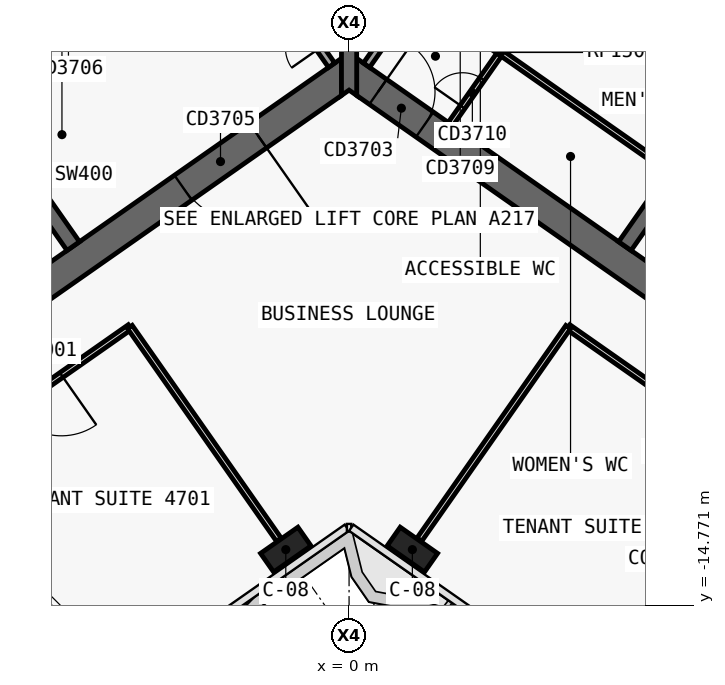
"""IFC4 building model, lengths in metres.
Left out: names, types, materials, properties, quantities, classifications, styles, units other than length and angle.
Written with IfcOpenShell. Run it as: python <this file> out.ifc"""

import sys

from ifc_helpers import new_model, si_unit, direction, frame, frame_2d, origin, origin_2d, place, context, subcontext, project, spatial, polyline, rectangle, outline, extrude, element, fill, save


model = new_model("IFC4")
c1 = context("Model", 3, precision=1e-05, world=origin(), true_north=direction((0.0, 1.0)))
c2 = subcontext(c1, "Body", "Model", "MODEL_VIEW")
j1 = project(units=[si_unit("LENGTHUNIT", "METRE"), si_unit("PLANEANGLEUNIT", "RADIAN")], contexts=[c1])
p1 = place(None, origin())
s1 = spatial("IfcSite", under=j1, at=p1, CompositionType="ELEMENT")
p2 = place(p1, origin())
s2 = spatial("IfcBuilding", under=s1, at=p2, CompositionType="ELEMENT")
p3 = place(p2, frame((0.0, 0.0, 202.2)))
s3 = spatial("IfcBuildingStorey", under=s2, at=p3, CompositionType="ELEMENT", Elevation=202.2)
p4 = place(p3, frame((0.029, 11.984, 0.0), z_axis=(0.0, 0.0, 1.0), x_axis=(-0.819151382952, -0.573577380837, 0.0)))
e1 = element("IfcWall", 1, at=p4, inside=s3, PredefinedType="SHEAR", context=c2, shape_type="SweptSolid", body=[
    extrude(outline(polyline([(33.898, 0.4), (0.56, 0.4), (-0.0, -0.4), (33.898, -0.4), (33.898, 0.4)])), origin(), (0.0, 0.0, 1.0), 3.9),
])
p5 = place(p3, frame((0.029, -0.712, 0.0), z_axis=(0.0, 0.0, 1.0), x_axis=(-0.819151758019, -0.573576845187, 0.0)))
e2 = element("IfcWall", 2, at=p5, inside=s3, PredefinedType="SHEAR", context=c2, shape_type="SweptSolid", body=[
    extrude(outline(polyline([(26.616, 0.4), (0.56, 0.4), (-0.0, -0.4), (26.616, -0.4), (26.616, 0.4)])), origin(), (0.0, 0.0, 1.0), 3.9),
])
p6 = place(p5, frame((2.966, 0.0, 0.0)))
e3 = element("IfcOpeningElement", 3, at=p6, cuts=e2, PredefinedType="OPENING", context=c2, shape_type="SweptSolid", body=[
    extrude(rectangle(XDim=2.4, YDim=2.1, at=frame_2d((1.2, 1.05))), frame((0.0, 0.41, 0.0), z_axis=(0.0, -1.0, 0.0), x_axis=(1.0, 0.0, 0.0)), (0.0, 0.0, 1.0), 0.82),
])
p7 = place(p5, frame((11.916, 0.0, 0.0)))
e4 = element("IfcOpeningElement", 4, at=p7, cuts=e2, PredefinedType="OPENING", context=c2, shape_type="SweptSolid", body=[
    extrude(rectangle(XDim=2.4, YDim=2.1, at=frame_2d((1.2, 1.05))), frame((0.0, 0.41, 0.0), z_axis=(0.0, -1.0, 0.0), x_axis=(1.0, 0.0, 0.0)), (0.0, 0.0, 1.0), 0.82),
])
p8 = place(p3, frame((-7.258, -5.326, 0.0), z_axis=(0.0, 0.0, 1.0), x_axis=(-0.573540709186, 0.819177059558, 0.0)))
e5 = element("IfcWall", 5, at=p8, inside=s3, PredefinedType="SHEAR", context=c2, shape_type="SweptSolid", body=[
    extrude(outline(polyline([(4.6, 0.2), (-0.0, 0.2), (-0.0, -0.2), (4.6, -0.2), (4.6, 0.2)])), origin(), (0.0, 0.0, 1.0), 3.9),
])
p9 = place(p3, frame((-2.638, 3.768, 0.0), z_axis=(0.0, 0.0, 1.0), x_axis=(-0.81915267502, -0.573575535572, 0.0)))
e6 = element("IfcWall", 6, at=p9, inside=s3, PredefinedType="SHEAR", context=c2, shape_type="SweptSolid", body=[
    extrude(outline(polyline([(26.2, 0.2), (0.0, 0.2), (0.0, -0.2), (26.2, -0.2), (26.2, 0.2)])), origin(), (0.0, 0.0, 1.0), 3.9),
])
p10 = place(p9, frame((1.169, 0.0, 0.0)))
e7 = element("IfcOpeningElement", 7, at=p10, cuts=e6, PredefinedType="OPENING", context=c2, shape_type="SweptSolid", body=[
    extrude(rectangle(XDim=1.1, YDim=2.1, at=frame_2d((0.55, 1.05))), frame((0.0, 0.21, 0.0), z_axis=(0.0, -1.0, 0.0), x_axis=(1.0, 0.0, 0.0)), (0.0, 0.0, 1.0), 0.42),
])
p11 = place(p9, frame((3.206, 0.0, 0.0)))
e8 = element("IfcOpeningElement", 8, at=p11, cuts=e6, PredefinedType="OPENING", context=c2, shape_type="SweptSolid", body=[
    extrude(rectangle(XDim=1.1, YDim=2.1, at=frame_2d((0.55, 1.05))), frame((0.0, 0.21, 0.0), z_axis=(0.0, -1.0, 0.0), x_axis=(1.0, 0.0, 0.0)), (0.0, 0.0, 1.0), 0.42),
])
p12 = place(p9, frame((5.244, 0.0, 0.0)))
e9 = element("IfcOpeningElement", 9, at=p12, cuts=e6, PredefinedType="OPENING", context=c2, shape_type="SweptSolid", body=[
    extrude(rectangle(XDim=1.1, YDim=2.1, at=frame_2d((0.55, 1.05))), frame((0.0, 0.21, 0.0), z_axis=(0.0, -1.0, 0.0), x_axis=(1.0, 0.0, 0.0)), (0.0, 0.0, 1.0), 0.42),
])
p13 = place(p9, frame((7.281, 0.0, 0.0)))
e10 = element("IfcOpeningElement", 10, at=p13, cuts=e6, PredefinedType="OPENING", context=c2, shape_type="SweptSolid", body=[
    extrude(rectangle(XDim=1.1, YDim=2.1, at=frame_2d((0.55, 1.05))), frame((0.0, 0.21, 0.0), z_axis=(0.0, -1.0, 0.0), x_axis=(1.0, 0.0, 0.0)), (0.0, 0.0, 1.0), 0.42),
])
p14 = place(p9, frame((9.688, 0.0, 0.0)))
e11 = element("IfcOpeningElement", 11, at=p14, cuts=e6, PredefinedType="OPENING", context=c2, shape_type="SweptSolid", body=[
    extrude(rectangle(XDim=1.1, YDim=2.1, at=frame_2d((0.55, 1.05))), frame((0.0, 0.21, 0.0), z_axis=(0.0, -1.0, 0.0), x_axis=(1.0, 0.0, 0.0)), (0.0, 0.0, 1.0), 0.42),
])
p15 = place(p9, frame((11.863, 0.0, 0.0)))
e12 = element("IfcOpeningElement", 12, at=p15, cuts=e6, PredefinedType="OPENING", context=c2, shape_type="SweptSolid", body=[
    extrude(rectangle(XDim=1.1, YDim=2.1, at=frame_2d((0.55, 1.05))), frame((0.0, 0.21, 0.0), z_axis=(0.0, -1.0, 0.0), x_axis=(1.0, 0.0, 0.0)), (0.0, 0.0, 1.0), 0.42),
])
p16 = place(p9, frame((15.175, 0.0, 0.0)))
e13 = element("IfcOpeningElement", 13, at=p16, cuts=e6, PredefinedType="OPENING", context=c2, shape_type="SweptSolid", body=[
    extrude(rectangle(XDim=1.0, YDim=2.1, at=frame_2d((0.5, 1.05))), frame((0.0, 0.21, 0.0), z_axis=(0.0, -1.0, 0.0), x_axis=(1.0, 0.0, 0.0)), (0.0, 0.0, 1.0), 0.42),
])
p17 = place(p3, frame((-0.029, 11.984, 0.0), z_axis=(0.0, 0.0, 1.0), x_axis=(0.819151382952, -0.573577380837, 0.0)))
e14 = element("IfcWall", 14, at=p17, inside=s3, PredefinedType="SHEAR", context=c2, shape_type="SweptSolid", body=[
    extrude(outline(polyline([(33.898, 0.4), (-0.0, 0.4), (0.56, -0.4), (33.898, -0.4), (33.898, 0.4)])), origin(), (0.0, 0.0, 1.0), 3.9),
])
p18 = place(p3, frame((-0.029, -0.712, 0.0), z_axis=(0.0, 0.0, 1.0), x_axis=(0.819151758019, -0.573576845187, 0.0)))
e15 = element("IfcWall", 15, at=p18, inside=s3, PredefinedType="SHEAR", context=c2, shape_type="SweptSolid", body=[
    extrude(outline(polyline([(26.616, 0.4), (-0.0, 0.4), (0.56, -0.4), (26.616, -0.4), (26.616, 0.4)])), origin(), (0.0, 0.0, 1.0), 3.9),
])
p19 = place(p18, frame((0.966, 0.0, 0.0)))
e16 = element("IfcOpeningElement", 16, at=p19, cuts=e15, PredefinedType="OPENING", context=c2, shape_type="SweptSolid", body=[
    extrude(rectangle(XDim=1.5, YDim=2.1, at=frame_2d((0.75, 1.05))), frame((0.0, 0.41, 0.0), z_axis=(0.0, -1.0, 0.0), x_axis=(1.0, 0.0, 0.0)), (0.0, 0.0, 1.0), 0.82),
])
p20 = place(p18, frame((12.366, 0.0, 0.0)))
e17 = element("IfcOpeningElement", 17, at=p20, cuts=e15, PredefinedType="OPENING", context=c2, shape_type="SweptSolid", body=[
    extrude(rectangle(XDim=1.5, YDim=2.1, at=frame_2d((0.75, 1.05))), frame((0.0, 0.41, 0.0), z_axis=(0.0, -1.0, 0.0), x_axis=(1.0, 0.0, 0.0)), (0.0, 0.0, 1.0), 0.82),
])
p21 = place(p3, frame((7.258, -5.326, 0.0), z_axis=(0.0, 0.0, 1.0), x_axis=(0.573540709186, 0.819177059558, 0.0)))
e18 = element("IfcWall", 18, at=p21, inside=s3, PredefinedType="SHEAR", context=c2, shape_type="SweptSolid", body=[
    extrude(outline(polyline([(-0.0, 0.2), (-0.0, -0.2), (4.6, -0.2), (4.6, 0.2), (-0.0, 0.2)])), origin(), (0.0, 0.0, 1.0), 3.9),
])
p22 = place(p3, frame((2.638, 3.768, 0.0), z_axis=(0.0, 0.0, 1.0), x_axis=(0.81915267502, -0.573575535572, 0.0)))
e19 = element("IfcWall", 19, at=p22, inside=s3, PredefinedType="SHEAR", context=c2, shape_type="SweptSolid", body=[
    extrude(outline(polyline([(0.0, 0.2), (0.0, -0.2), (26.2, -0.2), (26.2, 0.2), (0.0, 0.2)])), origin(), (0.0, 0.0, 1.0), 3.9),
])
p23 = place(p22, frame((9.637, 0.0, 0.0)))
e20 = element("IfcOpeningElement", 20, at=p23, cuts=e19, PredefinedType="OPENING", context=c2, shape_type="SweptSolid", body=[
    extrude(rectangle(XDim=1.2, YDim=2.1, at=frame_2d((0.6, 1.05))), frame((0.0, 0.21, 0.0), z_axis=(0.0, -1.0, 0.0), x_axis=(1.0, 0.0, 0.0)), (0.0, 0.0, 1.0), 0.42),
])
p24 = place(p22, frame((11.812, 0.0, 0.0)))
e21 = element("IfcOpeningElement", 21, at=p24, cuts=e19, PredefinedType="OPENING", context=c2, shape_type="SweptSolid", body=[
    extrude(rectangle(XDim=1.2, YDim=2.1, at=frame_2d((0.6, 1.05))), frame((0.0, 0.21, 0.0), z_axis=(0.0, -1.0, 0.0), x_axis=(1.0, 0.0, 0.0)), (0.0, 0.0, 1.0), 0.42),
])
p25 = place(p22, frame((13.988, 0.0, 0.0)))
e22 = element("IfcOpeningElement", 22, at=p25, cuts=e19, PredefinedType="OPENING", context=c2, shape_type="SweptSolid", body=[
    extrude(rectangle(XDim=1.2, YDim=2.1, at=frame_2d((0.6, 1.05))), frame((0.0, 0.21, 0.0), z_axis=(0.0, -1.0, 0.0), x_axis=(1.0, 0.0, 0.0)), (0.0, 0.0, 1.0), 0.42),
])
p26 = place(p22, frame((16.262, 0.0, 0.0)))
e23 = element("IfcOpeningElement", 23, at=p26, cuts=e19, PredefinedType="OPENING", context=c2, shape_type="SweptSolid", body=[
    extrude(rectangle(XDim=1.0, YDim=2.1, at=frame_2d((0.5, 1.05))), frame((0.0, 0.21, 0.0), z_axis=(0.0, -1.0, 0.0), x_axis=(1.0, 0.0, 0.0)), (0.0, 0.0, 1.0), 0.42),
])
p27 = place(p3, frame((0.0, -1.361, 0.0), z_axis=(0.0, 0.0, 1.0), x_axis=(0.0, 1.0, 0.0)))
e24 = element("IfcWall", 24, at=p27, inside=s3, PredefinedType="SHEAR", context=c2, shape_type="SweptSolid", body=[
    extrude(outline(polyline([(0.0, -0.2), (0.14, -0.2), (1.075, -0.2), (12.696, -0.2), (13.813, -0.2), (13.893, -0.2), (13.933, -0.172), (13.813, 0.0), (13.933, 0.172), (13.893, 0.2), (13.813, 0.2), (12.696, 0.2), (1.075, 0.2), (0.14, 0.2), (0.0, 0.2), (0.14, 0.0), (0.0, -0.2)])), origin(), (0.0, 0.0, 1.0), 3.9),
])
for number, where, z_axis, x_axis in (
    (25, (-1.665, -13.313, 0.0), (0.0, 0.0, 1.0), (-0.819, -0.574, 0.0)),
    (26, (1.665, -13.313, 0.0), (0.0, 0.0, 1.0), (0.819, -0.574, 0.0)),
):
    element("IfcColumn", number, at=place(p3, frame(where, z_axis=z_axis, x_axis=x_axis)), inside=s3, PredefinedType="COLUMN", context=c2, shape_type="SweptSolid", body=[
        extrude(rectangle(XDim=1.2, YDim=0.6, at=origin_2d()), origin(), (0.0, 0.0, 1.0), 3.9),
    ])
p28 = place(p3, frame((2.67, -2.114, 0.0), z_axis=(0.0, 0.0, 1.0), x_axis=(0.573576324356, 0.819152122709, 0.0)))
e27 = element("IfcWall", 27, at=p28, inside=s3, PredefinedType="PARTITIONING", context=c2, shape_type="SweptSolid", body=[
    extrude(rectangle(XDim=4.6, YDim=0.15, at=frame_2d((2.3, 0.0))), origin(), (0.0, 0.0, 1.0), 3.62),
])
p29 = place(p28, frame((0.55, 0.0, 0.0)))
e28 = element("IfcOpeningElement", 28, at=p29, cuts=e27, PredefinedType="OPENING", context=c2, shape_type="SweptSolid", body=[
    extrude(rectangle(XDim=0.9, YDim=2.1, at=frame_2d((0.45, 1.05))), frame((0.0, 0.085, 0.0), z_axis=(0.0, -1.0, 0.0), x_axis=(1.0, 0.0, 0.0)), (0.0, 0.0, 1.0), 0.17),
])
p30 = place(p28, frame((2.95, 0.0, 0.0)))
e29 = element("IfcOpeningElement", 29, at=p30, cuts=e27, PredefinedType="OPENING", context=c2, shape_type="SweptSolid", body=[
    extrude(rectangle(XDim=0.9, YDim=2.1, at=frame_2d((0.45, 1.05))), frame((0.0, 0.085, 0.0), z_axis=(0.0, -1.0, 0.0), x_axis=(1.0, 0.0, 0.0)), (0.0, 0.0, 1.0), 0.17),
])
p31 = place(p3, frame((1.86, 1.261, 0.0), z_axis=(0.0, 0.0, 1.0), x_axis=(0.819103967032, -0.573645091666, 0.0)))
e30 = element("IfcWall", 30, at=p31, inside=s3, PredefinedType="PARTITIONING", context=c2, shape_type="SweptSolid", body=[
    extrude(rectangle(XDim=2.6, YDim=0.15, at=frame_2d((1.3, 0.0))), origin(), (0.0, 0.0, 1.0), 3.62),
])
p32 = place(p31, frame((0.85, 0.0, 0.0)))
e31 = element("IfcOpeningElement", 31, at=p32, cuts=e30, PredefinedType="OPENING", context=c2, shape_type="SweptSolid", body=[
    extrude(rectangle(XDim=0.9, YDim=2.1, at=frame_2d((0.45, 1.05))), frame((0.0, 0.085, 0.0), z_axis=(0.0, -1.0, 0.0), x_axis=(1.0, 0.0, 0.0)), (0.0, 0.0, 1.0), 0.17),
])
p33 = place(p3, frame((3.99, -0.23, 0.0), z_axis=(0.0, 0.0, 1.0), x_axis=(0.819153326956, -0.573574604508, 0.0)))
e32 = element("IfcWall", 32, at=p33, inside=s3, PredefinedType="PARTITIONING", context=c2, shape_type="SweptSolid", body=[
    extrude(rectangle(XDim=5.4, YDim=0.15, at=frame_2d((2.7, 0.0))), origin(), (0.0, 0.0, 1.0), 3.62),
])
p34 = place(p3, frame((-0.459, -0.565, 0.0), z_axis=(0.0, 0.0, 1.0), x_axis=(-0.573576324356, 0.819152122709, 0.0)))
e33 = element("IfcWall", 33, at=p34, inside=s3, PredefinedType="SOLIDWALL", context=c2, shape_type="SweptSolid", body=[
    extrude(rectangle(XDim=4.6, YDim=0.2, at=frame_2d((2.3, 0.0))), origin(), (0.0, 0.0, 1.0), 3.62),
])
p35 = place(p34, frame((0.55, 0.0, 0.0)))
e34 = element("IfcOpeningElement", 34, at=p35, cuts=e33, PredefinedType="OPENING", context=c2, shape_type="SweptSolid", body=[
    extrude(rectangle(XDim=0.9, YDim=2.1, at=frame_2d((0.45, 1.05))), frame((0.0, 0.11, 0.0), z_axis=(0.0, -1.0, 0.0), x_axis=(1.0, 0.0, 0.0)), (0.0, 0.0, 1.0), 0.22),
])
p36 = place(p3, frame((0.459, -0.565, 0.0), z_axis=(0.0, 0.0, 1.0), x_axis=(0.573576324356, 0.819152122709, 0.0)))
e35 = element("IfcWall", 35, at=p36, inside=s3, PredefinedType="SOLIDWALL", context=c2, shape_type="SweptSolid", body=[
    extrude(rectangle(XDim=4.6, YDim=0.2, at=frame_2d((2.3, 0.0))), origin(), (0.0, 0.0, 1.0), 3.62),
])
p37 = place(p36, frame((0.55, 0.0, 0.0)))
e36 = element("IfcOpeningElement", 36, at=p37, cuts=e35, PredefinedType="OPENING", context=c2, shape_type="SweptSolid", body=[
    extrude(rectangle(XDim=0.9, YDim=2.1, at=frame_2d((0.45, 1.05))), frame((0.0, 0.11, 0.0), z_axis=(0.0, -1.0, 0.0), x_axis=(1.0, 0.0, 0.0)), (0.0, 0.0, 1.0), 0.22),
])
p38 = place(p3, frame((11.912, -11.759, 0.0), z_axis=(0.0, 0.0, 1.0), x_axis=(-0.819150881364, 0.573578097177, 0.0)))
e37 = element("IfcWall", 37, at=p38, inside=s3, PredefinedType="PARTITIONING", context=c2, shape_type="SweptSolid", body=[
    extrude(rectangle(XDim=7.502, YDim=0.15, at=frame_2d((3.751, 0.0))), origin(), (0.0, 0.0, 1.0), 3.0),
])
p39 = place(p38, frame((2.951, 0.0, 0.0)))
e38 = element("IfcOpeningElement", 38, at=p39, cuts=e37, PredefinedType="OPENING", context=c2, shape_type="SweptSolid", body=[
    extrude(rectangle(XDim=1.6, YDim=2.1, at=frame_2d((0.8, 1.05))), frame((0.0, 0.085, 0.0), z_axis=(0.0, -1.0, 0.0), x_axis=(1.0, 0.0, 0.0)), (0.0, 0.0, 1.0), 0.17),
])
p40 = place(p3, frame((-5.766, -7.456, 0.0), z_axis=(0.0, 0.0, 1.0), x_axis=(-0.819147828287, -0.573582457378, 0.0)))
e39 = element("IfcWall", 39, at=p40, inside=s3, PredefinedType="PARTITIONING", context=c2, shape_type="SweptSolid", body=[
    extrude(rectangle(XDim=6.002, YDim=0.15, at=frame_2d((3.001, 0.0))), origin(), (0.0, 0.0, 1.0), 3.0),
])
p41 = place(p40, frame((2.201, 0.0, 0.0)))
e40 = element("IfcOpeningElement", 40, at=p41, cuts=e39, PredefinedType="OPENING", context=c2, shape_type="SweptSolid", body=[
    extrude(rectangle(XDim=1.6, YDim=2.1, at=frame_2d((0.8, 1.05))), frame((0.0, 0.085, 0.0), z_axis=(0.0, -1.0, 0.0), x_axis=(1.0, 0.0, 0.0)), (0.0, 0.0, 1.0), 0.17),
])
p42 = place(p3, frame((1.849, -13.051, 0.0), z_axis=(0.0, 0.0, 1.0), x_axis=(0.573577493031, 0.819151304393, 0.0)))
e41 = element("IfcWall", 41, at=p42, inside=s3, PredefinedType="PARTITIONING", context=c2, shape_type="SweptSolid", body=[
    extrude(rectangle(XDim=6.83, YDim=0.15, at=frame_2d((3.415, 0.0))), origin(), (0.0, 0.0, 1.0), 3.0),
])
p43 = place(p3, frame((-1.849, -13.051, 0.0), z_axis=(0.0, 0.0, 1.0), x_axis=(-0.57357985571, 0.819149650018, 0.0)))
e42 = element("IfcWall", 42, at=p43, inside=s3, PredefinedType="PARTITIONING", context=c2, shape_type="SweptSolid", body=[
    extrude(rectangle(XDim=6.832, YDim=0.15, at=frame_2d((3.416, 0.0))), origin(), (0.0, 0.0, 1.0), 3.0),
])
p44 = place(p3, frame((-6.379, -17.041, 0.0), z_axis=(0.0, 0.0, 1.0), x_axis=(-0.573560622794, 0.819163116834, 0.0)))
e43 = element("IfcWall", 43, at=p44, inside=s3, PredefinedType="PARTITIONING", context=c2, shape_type="SweptSolid", body=[
    extrude(rectangle(XDim=3.501, YDim=0.15, at=frame_2d((1.75, 0.0))), origin(), (0.0, 0.0, 1.0), 2.9),
])
p45 = place(p6, origin())
e44 = element("IfcDoor", 44, at=p45, inside=s3, OperationType="DOUBLE_DOOR_SINGLE_SWING", PredefinedType="DOOR", context=c2, shape_type="SweptSolid", body=[
    extrude(rectangle(XDim=2.4, YDim=2.1, at=frame_2d((1.2, 1.05))), frame((0.0, 0.025, 0.0), z_axis=(0.0, -1.0, 0.0), x_axis=(1.0, 0.0, 0.0)), (0.0, 0.0, 1.0), 0.05),
])
fill(e3, e44)
p46 = place(p29, origin())
e45 = element("IfcDoor", 45, at=p46, inside=s3, OperationType="SINGLE_SWING_RIGHT", PredefinedType="DOOR", context=c2, shape_type="SweptSolid", body=[
    extrude(rectangle(XDim=0.9, YDim=2.1, at=frame_2d((0.45, 1.05))), frame((0.0, 0.025, 0.0), z_axis=(0.0, -1.0, 0.0), x_axis=(1.0, 0.0, 0.0)), (0.0, 0.0, 1.0), 0.05),
])
fill(e28, e45)
p47 = place(p19, origin())
e46 = element("IfcDoor", 46, at=p47, inside=s3, OperationType="SINGLE_SWING_RIGHT", PredefinedType="DOOR", context=c2, shape_type="SweptSolid", body=[
    extrude(rectangle(XDim=1.5, YDim=2.1, at=frame_2d((0.75, 1.05))), frame((0.0, 0.025, 0.0), z_axis=(0.0, -1.0, 0.0), x_axis=(1.0, 0.0, 0.0)), (0.0, 0.0, 1.0), 0.05),
])
fill(e16, e46)
p48 = place(p41, origin())
e47 = element("IfcDoor", 47, at=p48, inside=s3, OperationType="DOUBLE_DOOR_SINGLE_SWING", PredefinedType="DOOR", context=c2, shape_type="SweptSolid", body=[
    extrude(rectangle(XDim=1.6, YDim=2.1, at=frame_2d((0.8, 1.05))), frame((0.0, 0.025, 0.0), z_axis=(0.0, -1.0, 0.0), x_axis=(1.0, 0.0, 0.0)), (0.0, 0.0, 1.0), 0.05),
])
fill(e40, e47)
save(model, sys.argv[1])
